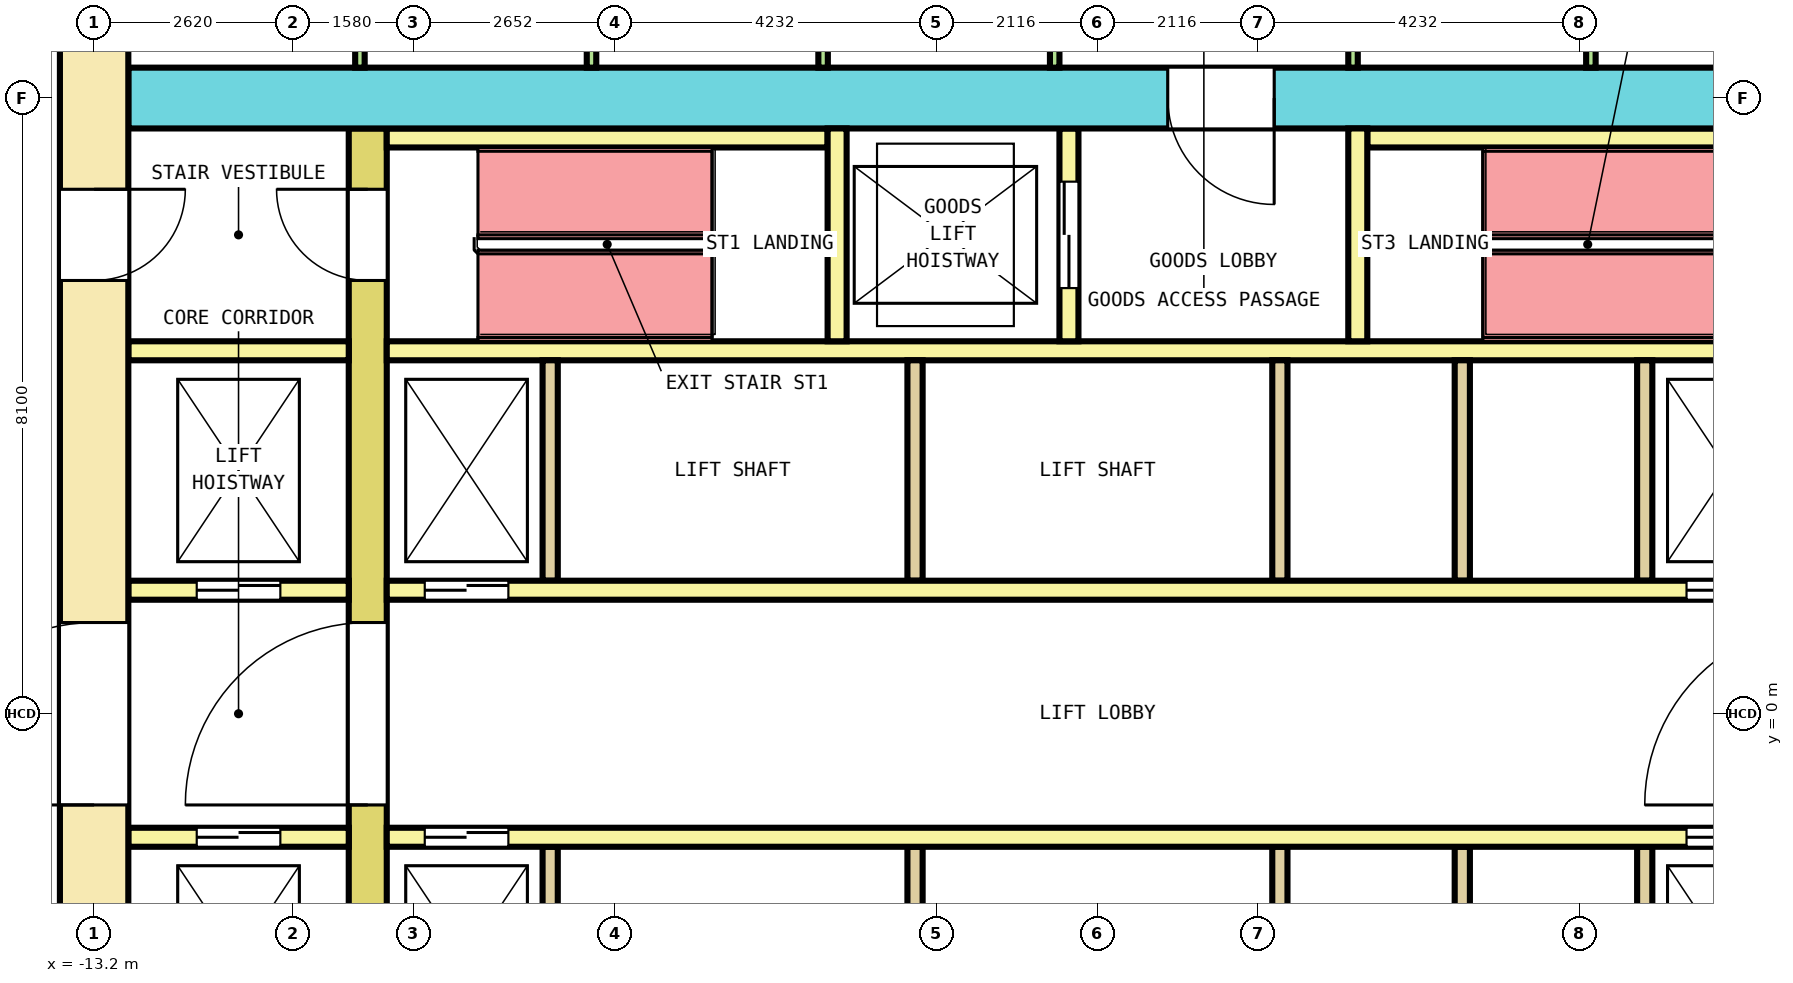
"""IFC4 building model, lengths in metres.
Left out: names, types, materials, properties, quantities, classifications, styles, units other than length and angle.
Written with IfcOpenShell. Run it as: python <this file> out.ifc"""

import sys

from ifc_helpers import new_model, si_unit, direction, frame, frame_2d, origin, place, context, subcontext, project, spatial, rectangle, extrude, element, fill, save


model = new_model("IFC4")
c1 = context("Model", 3, precision=1e-05, world=origin(), true_north=direction((0.0, 1.0)))
c2 = subcontext(c1, "Body", "Model", "MODEL_VIEW")
j1 = project(units=[si_unit("LENGTHUNIT", "METRE"), si_unit("PLANEANGLEUNIT", "RADIAN")], contexts=[c1])
p1 = place(None, origin())
s1 = spatial("IfcSite", under=j1, at=p1, CompositionType="ELEMENT")
p2 = place(p1, origin())
s2 = spatial("IfcBuilding", under=s1, at=p2, CompositionType="ELEMENT")
p3 = place(p2, frame((0.0, 0.0, 19.0)))
s3 = spatial("IfcBuildingStorey", under=s2, at=p3, CompositionType="ELEMENT", Elevation=19.0)
p4 = place(p3, frame((-13.2, -10.35, 0.0), z_axis=(0.0, 0.0, 1.0), x_axis=(0.0, 1.0, 0.0)))
e1 = element("IfcWall", 1, at=p4, inside=s3, PredefinedType="SHEAR", context=c2, shape_type="SweptSolid", body=[
    extrude(rectangle(XDim=20.7, YDim=0.9, at=frame_2d((10.35, 0.0))), origin(), (0.0, 0.0, 1.0), 4.1),
])
p5 = place(p4, frame((9.15, 0.0, 0.0)))
e2 = element("IfcOpeningElement", 2, at=p5, cuts=e1, PredefinedType="OPENING", context=c2, shape_type="SweptSolid", body=[
    extrude(rectangle(XDim=2.4, YDim=2.1, at=frame_2d((1.2, 1.05))), frame((0.0, 0.46, 0.0), z_axis=(0.0, -1.0, 0.0), x_axis=(1.0, 0.0, 0.0)), (0.0, 0.0, 1.0), 0.92),
])
p6 = place(p4, frame((16.05, 0.0, 0.0)))
e3 = element("IfcOpeningElement", 3, at=p6, cuts=e1, PredefinedType="OPENING", context=c2, shape_type="SweptSolid", body=[
    extrude(rectangle(XDim=1.2, YDim=2.1, at=frame_2d((0.6, 1.05))), frame((0.0, 0.46, 0.0), z_axis=(0.0, -1.0, 0.0), x_axis=(1.0, 0.0, 0.0)), (0.0, 0.0, 1.0), 0.92),
])
p7 = place(p4, frame((3.45, 0.0, 0.0)))
e4 = element("IfcOpeningElement", 4, at=p7, cuts=e1, PredefinedType="OPENING", context=c2, shape_type="SweptSolid", body=[
    extrude(rectangle(XDim=1.2, YDim=2.1, at=frame_2d((0.6, 1.05))), frame((0.0, 0.46, 0.0), z_axis=(0.0, -1.0, 0.0), x_axis=(1.0, 0.0, 0.0)), (0.0, 0.0, 1.0), 0.92),
])
p8 = place(p3, frame((-12.75, 8.1, 0.0), z_axis=(0.0, 0.0, 1.0), x_axis=(1.0, 0.0, 0.0)))
e5 = element("IfcWall", 5, at=p8, inside=s3, PredefinedType="SHEAR", context=c2, shape_type="SweptSolid", body=[
    extrude(rectangle(XDim=25.5, YDim=0.8, at=frame_2d((12.75, 0.0))), origin(), (0.0, 0.0, 1.0), 4.1),
])
p9 = place(p8, frame((13.675, 0.0, 0.0)))
e6 = element("IfcOpeningElement", 6, at=p9, cuts=e5, PredefinedType="OPENING", context=c2, shape_type="SweptSolid", body=[
    extrude(rectangle(XDim=1.4, YDim=2.1, at=frame_2d((0.7, 1.05))), frame((0.0, 0.41, 0.0), z_axis=(0.0, -1.0, 0.0), x_axis=(1.0, 0.0, 0.0)), (0.0, 0.0, 1.0), 0.82),
])
p10 = place(p3, frame((-9.6, -7.7, 0.0), z_axis=(0.0, 0.0, 1.0), x_axis=(0.0, 1.0, 0.0)))
e7 = element("IfcWall", 7, at=p10, inside=s3, PredefinedType="SHEAR", context=c2, shape_type="SweptSolid", body=[
    extrude(rectangle(XDim=15.4, YDim=0.5, at=frame_2d((7.7, 0.0))), origin(), (0.0, 0.0, 1.0), 4.1),
])
p11 = place(p10, frame((6.5, 0.0, 0.0)))
e8 = element("IfcOpeningElement", 8, at=p11, cuts=e7, PredefinedType="OPENING", context=c2, shape_type="SweptSolid", body=[
    extrude(rectangle(XDim=2.4, YDim=2.1, at=frame_2d((1.2, 1.05))), frame((0.0, 0.26, 0.0), z_axis=(0.0, -1.0, 0.0), x_axis=(1.0, 0.0, 0.0)), (0.0, 0.0, 1.0), 0.52),
])
p12 = place(p10, frame((13.4, 0.0, 0.0)))
e9 = element("IfcOpeningElement", 9, at=p12, cuts=e7, PredefinedType="OPENING", context=c2, shape_type="SweptSolid", body=[
    extrude(rectangle(XDim=1.2, YDim=2.1, at=frame_2d((0.6, 1.05))), frame((0.0, 0.26, 0.0), z_axis=(0.0, -1.0, 0.0), x_axis=(1.0, 0.0, 0.0)), (0.0, 0.0, 1.0), 0.52),
])
p13 = place(p10, frame((0.8, 0.0, 0.0)))
e10 = element("IfcOpeningElement", 10, at=p13, cuts=e7, PredefinedType="OPENING", context=c2, shape_type="SweptSolid", body=[
    extrude(rectangle(XDim=1.2, YDim=2.1, at=frame_2d((0.6, 1.05))), frame((0.0, 0.26, 0.0), z_axis=(0.0, -1.0, 0.0), x_axis=(1.0, 0.0, 0.0)), (0.0, 0.0, 1.0), 0.52),
])
p14 = place(p3, frame((-12.75, 1.625, 0.0), z_axis=(0.0, 0.0, 1.0), x_axis=(1.0, 0.0, 0.0)))
e11 = element("IfcWall", 11, at=p14, inside=s3, PredefinedType="SOLIDWALL", context=c2, shape_type="SweptSolid", body=[
    extrude(rectangle(XDim=2.9, YDim=0.25, at=frame_2d((1.45, 0.0))), origin(), (0.0, 0.0, 1.0), 4.1),
])
p15 = place(p14, frame((0.9, 0.0, 0.0)))
e12 = element("IfcOpeningElement", 12, at=p15, cuts=e11, PredefinedType="OPENING", context=c2, shape_type="SweptSolid", body=[
    extrude(rectangle(XDim=1.1, YDim=2.1, at=frame_2d((0.55, 1.05))), frame((0.0, 0.135, 0.0), z_axis=(0.0, -1.0, 0.0), x_axis=(1.0, 0.0, 0.0)), (0.0, 0.0, 1.0), 0.27),
])
p16 = place(p3, frame((-9.35, 1.625, 0.0), z_axis=(0.0, 0.0, 1.0), x_axis=(1.0, 0.0, 0.0)))
e13 = element("IfcWall", 13, at=p16, inside=s3, PredefinedType="SOLIDWALL", context=c2, shape_type="SweptSolid", body=[
    extrude(rectangle(XDim=18.7, YDim=0.25, at=frame_2d((9.35, 0.0))), origin(), (0.0, 0.0, 1.0), 4.1),
])
p17 = place(p16, frame((0.5, 0.0, 0.0)))
e14 = element("IfcOpeningElement", 14, at=p17, cuts=e13, PredefinedType="OPENING", context=c2, shape_type="SweptSolid", body=[
    extrude(rectangle(XDim=1.1, YDim=2.1, at=frame_2d((0.55, 1.05))), frame((0.0, 0.135, 0.0), z_axis=(0.0, -1.0, 0.0), x_axis=(1.0, 0.0, 0.0)), (0.0, 0.0, 1.0), 0.27),
])
p18 = place(p16, frame((17.1, 0.0, 0.0)))
e15 = element("IfcOpeningElement", 15, at=p18, cuts=e13, PredefinedType="OPENING", context=c2, shape_type="SweptSolid", body=[
    extrude(rectangle(XDim=1.1, YDim=2.1, at=frame_2d((0.55, 1.05))), frame((0.0, 0.135, 0.0), z_axis=(0.0, -1.0, 0.0), x_axis=(1.0, 0.0, 0.0)), (0.0, 0.0, 1.0), 0.27),
])
p19 = place(p3, frame((-12.75, 4.775, 0.0), z_axis=(0.0, 0.0, 1.0), x_axis=(1.0, 0.0, 0.0)))
e16 = element("IfcWall", 16, at=p19, inside=s3, PredefinedType="SOLIDWALL", context=c2, shape_type="SweptSolid", body=[
    extrude(rectangle(XDim=2.9, YDim=0.25, at=frame_2d((1.45, 0.0))), origin(), (0.0, 0.0, 1.0), 4.1),
])
p20 = place(p3, frame((-9.35, 4.775, 0.0), z_axis=(0.0, 0.0, 1.0), x_axis=(1.0, 0.0, 0.0)))
e17 = element("IfcWall", 17, at=p20, inside=s3, PredefinedType="SOLIDWALL", context=c2, shape_type="SweptSolid", body=[
    extrude(rectangle(XDim=18.7, YDim=0.25, at=frame_2d((9.35, 0.0))), origin(), (0.0, 0.0, 1.0), 4.1),
])
for number, where, z_axis, x_axis in (
    (18, (-7.2, 1.75, 0.0), (0.0, 0.0, 1.0), (0.0, 1.0, 0.0)),
    (19, (-2.4, 1.75, 0.0), (0.0, 0.0, 1.0), (0.0, 1.0, 0.0)),
    (20, (2.4, 1.75, 0.0), (0.0, 0.0, 1.0), (0.0, 1.0, 0.0)),
    (21, (4.8, 1.75, 0.0), (0.0, 0.0, 1.0), (0.0, 1.0, 0.0)),
    (22, (7.2, 1.75, 0.0), (0.0, 0.0, 1.0), (0.0, 1.0, 0.0)),
):
    element("IfcWall", number, at=place(p3, frame(where, z_axis=z_axis, x_axis=x_axis)), inside=s3, PredefinedType="SOLIDWALL", context=c2, shape_type="SweptSolid", body=[
        extrude(rectangle(XDim=2.9, YDim=0.2, at=frame_2d((1.45, 0.0))), origin(), (0.0, 0.0, 1.0), 4.1),
    ])
p21 = place(p3, frame((-12.75, -1.625, 0.0), z_axis=(0.0, 0.0, 1.0), x_axis=(1.0, 0.0, 0.0)))
e23 = element("IfcWall", 23, at=p21, inside=s3, PredefinedType="SOLIDWALL", context=c2, shape_type="SweptSolid", body=[
    extrude(rectangle(XDim=2.9, YDim=0.25, at=frame_2d((1.45, 0.0))), origin(), (0.0, 0.0, 1.0), 4.1),
])
p22 = place(p21, frame((0.9, 0.0, 0.0)))
e24 = element("IfcOpeningElement", 24, at=p22, cuts=e23, PredefinedType="OPENING", context=c2, shape_type="SweptSolid", body=[
    extrude(rectangle(XDim=1.1, YDim=2.1, at=frame_2d((0.55, 1.05))), frame((0.0, 0.135, 0.0), z_axis=(0.0, -1.0, 0.0), x_axis=(1.0, 0.0, 0.0)), (0.0, 0.0, 1.0), 0.27),
])
p23 = place(p3, frame((-9.35, -1.625, 0.0), z_axis=(0.0, 0.0, 1.0), x_axis=(1.0, 0.0, 0.0)))
e25 = element("IfcWall", 25, at=p23, inside=s3, PredefinedType="SOLIDWALL", context=c2, shape_type="SweptSolid", body=[
    extrude(rectangle(XDim=18.7, YDim=0.25, at=frame_2d((9.35, 0.0))), origin(), (0.0, 0.0, 1.0), 4.1),
])
p24 = place(p23, frame((0.5, 0.0, 0.0)))
e26 = element("IfcOpeningElement", 26, at=p24, cuts=e25, PredefinedType="OPENING", context=c2, shape_type="SweptSolid", body=[
    extrude(rectangle(XDim=1.1, YDim=2.1, at=frame_2d((0.55, 1.05))), frame((0.0, 0.135, 0.0), z_axis=(0.0, -1.0, 0.0), x_axis=(1.0, 0.0, 0.0)), (0.0, 0.0, 1.0), 0.27),
])
p25 = place(p23, frame((17.1, 0.0, 0.0)))
e27 = element("IfcOpeningElement", 27, at=p25, cuts=e25, PredefinedType="OPENING", context=c2, shape_type="SweptSolid", body=[
    extrude(rectangle(XDim=1.1, YDim=2.1, at=frame_2d((0.55, 1.05))), frame((0.0, 0.135, 0.0), z_axis=(0.0, -1.0, 0.0), x_axis=(1.0, 0.0, 0.0)), (0.0, 0.0, 1.0), 0.27),
])
for number, where, z_axis, x_axis in (
    (28, (-7.2, -4.65, 0.0), (0.0, 0.0, 1.0), (0.0, 1.0, 0.0)),
    (29, (-2.4, -4.65, 0.0), (0.0, 0.0, 1.0), (0.0, 1.0, 0.0)),
    (30, (2.4, -4.65, 0.0), (0.0, 0.0, 1.0), (0.0, 1.0, 0.0)),
    (31, (4.8, -4.65, 0.0), (0.0, 0.0, 1.0), (0.0, 1.0, 0.0)),
    (32, (7.2, -4.65, 0.0), (0.0, 0.0, 1.0), (0.0, 1.0, 0.0)),
):
    element("IfcWall", number, at=place(p3, frame(where, z_axis=z_axis, x_axis=x_axis)), inside=s3, PredefinedType="SOLIDWALL", context=c2, shape_type="SweptSolid", body=[
        extrude(rectangle(XDim=2.9, YDim=0.2, at=frame_2d((1.45, 0.0))), origin(), (0.0, 0.0, 1.0), 4.1),
    ])
for number, where, z_axis, x_axis in (
    (33, (-9.35, 7.575, 0.0), (0.0, 0.0, 1.0), (1.0, 0.0, 0.0)),
    (34, (3.55, 7.575, 0.0), (0.0, 0.0, 1.0), (1.0, 0.0, 0.0)),
):
    element("IfcWall", number, at=place(p3, frame(where, z_axis=z_axis, x_axis=x_axis)), inside=s3, PredefinedType="SOLIDWALL", context=c2, shape_type="SweptSolid", body=[
        extrude(rectangle(XDim=5.8, YDim=0.25, at=frame_2d((2.9, 0.0))), origin(), (0.0, 0.0, 1.0), 4.1),
    ])
p26 = place(p3, frame((-3.425, 4.9, 0.0), z_axis=(0.0, 0.0, 1.0), x_axis=(0.0, 1.0, 0.0)))
e35 = element("IfcWall", 35, at=p26, inside=s3, PredefinedType="SOLIDWALL", context=c2, shape_type="SweptSolid", body=[
    extrude(rectangle(XDim=2.8, YDim=0.25, at=frame_2d((1.4, 0.0))), origin(), (0.0, 0.0, 1.0), 4.1),
])
p27 = place(p3, frame((-0.375, 4.9, 0.0), z_axis=(0.0, 0.0, 1.0), x_axis=(0.0, 1.0, 0.0)))
e36 = element("IfcWall", 36, at=p27, inside=s3, PredefinedType="SOLIDWALL", context=c2, shape_type="SweptSolid", body=[
    extrude(rectangle(XDim=2.8, YDim=0.25, at=frame_2d((1.4, 0.0))), origin(), (0.0, 0.0, 1.0), 4.1),
])
p28 = place(p27, frame((0.7, 0.0, 0.0)))
e37 = element("IfcOpeningElement", 37, at=p28, cuts=e36, PredefinedType="OPENING", context=c2, shape_type="SweptSolid", body=[
    extrude(rectangle(XDim=1.4, YDim=2.1, at=frame_2d((0.7, 1.05))), frame((0.0, 0.135, 0.0), z_axis=(0.0, -1.0, 0.0), x_axis=(1.0, 0.0, 0.0)), (0.0, 0.0, 1.0), 0.27),
])
p29 = place(p3, frame((3.425, 4.9, 0.0), z_axis=(0.0, 0.0, 1.0), x_axis=(0.0, 1.0, 0.0)))
e38 = element("IfcWall", 38, at=p29, inside=s3, PredefinedType="SOLIDWALL", context=c2, shape_type="SweptSolid", body=[
    extrude(rectangle(XDim=2.8, YDim=0.25, at=frame_2d((1.4, 0.0))), origin(), (0.0, 0.0, 1.0), 4.1),
])
for number, where, z_axis, x_axis in (
    (39, (-9.703, 8.5, 0.0), (0.0, 0.0, 1.0), (0.0, 1.0, 0.0)),
    (40, (-6.656, 8.5, 0.0), (0.0, 0.0, 1.0), (0.0, 1.0, 0.0)),
    (41, (-3.609, 8.5, 0.0), (0.0, 0.0, 1.0), (0.0, 1.0, 0.0)),
    (42, (-0.562, 8.5, 0.0), (0.0, 0.0, 1.0), (0.0, 1.0, 0.0)),
    (43, (3.363, 8.5, 0.0), (0.0, 0.0, 1.0), (0.0, 1.0, 0.0)),
    (44, (6.492, 8.5, 0.0), (0.0, 0.0, 1.0), (0.0, 1.0, 0.0)),
):
    element("IfcWall", number, at=place(p3, frame(where, z_axis=z_axis, x_axis=x_axis)), inside=s3, PredefinedType="PARTITIONING", context=c2, shape_type="SweptSolid", body=[
        extrude(rectangle(XDim=1.85, YDim=0.125, at=frame_2d((0.925, 0.0))), origin(), (0.0, 0.0, 1.0), 4.1),
    ])
p30 = place(p15, origin())
e45 = element("IfcDoor", 45, at=p30, inside=s3, OperationType="DOUBLE_DOOR_SLIDING", PredefinedType="DOOR", context=c2, shape_type="SweptSolid", body=[
    extrude(rectangle(XDim=1.1, YDim=2.1, at=frame_2d((0.55, 1.05))), frame((0.0, 0.075, 0.0), z_axis=(0.0, -1.0, 0.0), x_axis=(1.0, 0.0, 0.0)), (0.0, 0.0, 1.0), 0.15),
])
fill(e12, e45)
p31 = place(p17, origin())
e46 = element("IfcDoor", 46, at=p31, inside=s3, OperationType="DOUBLE_DOOR_SLIDING", PredefinedType="DOOR", context=c2, shape_type="SweptSolid", body=[
    extrude(rectangle(XDim=1.1, YDim=2.1, at=frame_2d((0.55, 1.05))), frame((0.0, 0.075, 0.0), z_axis=(0.0, -1.0, 0.0), x_axis=(1.0, 0.0, 0.0)), (0.0, 0.0, 1.0), 0.15),
])
fill(e14, e46)
p32 = place(p18, origin())
e47 = element("IfcDoor", 47, at=p32, inside=s3, OperationType="DOUBLE_DOOR_SLIDING", PredefinedType="DOOR", context=c2, shape_type="SweptSolid", body=[
    extrude(rectangle(XDim=1.1, YDim=2.1, at=frame_2d((0.55, 1.05))), frame((0.0, 0.075, 0.0), z_axis=(0.0, -1.0, 0.0), x_axis=(1.0, 0.0, 0.0)), (0.0, 0.0, 1.0), 0.15),
])
fill(e15, e47)
p33 = place(p22, origin())
e48 = element("IfcDoor", 48, at=p33, inside=s3, OperationType="DOUBLE_DOOR_SLIDING", PredefinedType="DOOR", context=c2, shape_type="SweptSolid", body=[
    extrude(rectangle(XDim=1.1, YDim=2.1, at=frame_2d((0.55, 1.05))), frame((0.0, 0.075, 0.0), z_axis=(0.0, -1.0, 0.0), x_axis=(1.0, 0.0, 0.0)), (0.0, 0.0, 1.0), 0.15),
])
fill(e24, e48)
p34 = place(p24, origin())
e49 = element("IfcDoor", 49, at=p34, inside=s3, OperationType="DOUBLE_DOOR_SLIDING", PredefinedType="DOOR", context=c2, shape_type="SweptSolid", body=[
    extrude(rectangle(XDim=1.1, YDim=2.1, at=frame_2d((0.55, 1.05))), frame((0.0, 0.075, 0.0), z_axis=(0.0, -1.0, 0.0), x_axis=(1.0, 0.0, 0.0)), (0.0, 0.0, 1.0), 0.15),
])
fill(e26, e49)
p35 = place(p25, origin())
e50 = element("IfcDoor", 50, at=p35, inside=s3, OperationType="DOUBLE_DOOR_SLIDING", PredefinedType="DOOR", context=c2, shape_type="SweptSolid", body=[
    extrude(rectangle(XDim=1.1, YDim=2.1, at=frame_2d((0.55, 1.05))), frame((0.0, 0.075, 0.0), z_axis=(0.0, -1.0, 0.0), x_axis=(1.0, 0.0, 0.0)), (0.0, 0.0, 1.0), 0.15),
])
fill(e27, e50)
p36 = place(p28, origin())
e51 = element("IfcDoor", 51, at=p36, inside=s3, OperationType="DOUBLE_DOOR_SLIDING", PredefinedType="DOOR", context=c2, shape_type="SweptSolid", body=[
    extrude(rectangle(XDim=1.4, YDim=2.1, at=frame_2d((0.7, 1.05))), frame((0.0, 0.075, 0.0), z_axis=(0.0, -1.0, 0.0), x_axis=(1.0, 0.0, 0.0)), (0.0, 0.0, 1.0), 0.15),
])
fill(e37, e51)
p37 = place(p11, origin())
e52 = element("IfcDoor", 52, at=p37, inside=s3, OperationType="DOUBLE_DOOR_SINGLE_SWING", PredefinedType="DOOR", context=c2, shape_type="SweptSolid", body=[
    extrude(rectangle(XDim=2.4, YDim=2.1, at=frame_2d((1.2, 1.05))), frame((0.0, 0.2, 0.0), z_axis=(0.0, -1.0, 0.0), x_axis=(1.0, 0.0, 0.0)), (0.0, 0.0, 1.0), 0.4),
])
fill(e8, e52)
p38 = place(p5, origin())
e53 = element("IfcDoor", 53, at=p38, inside=s3, OperationType="DOUBLE_DOOR_SINGLE_SWING", PredefinedType="DOOR", context=c2, shape_type="SweptSolid", body=[
    extrude(rectangle(XDim=2.4, YDim=2.1, at=frame_2d((1.2, 1.05))), frame((0.0, 0.3, 0.0), z_axis=(0.0, -1.0, 0.0), x_axis=(1.0, 0.0, 0.0)), (0.0, 0.0, 1.0), 0.6),
])
fill(e2, e53)
p39 = place(p12, origin())
e54 = element("IfcDoor", 54, at=p39, inside=s3, OperationType="SINGLE_SWING_RIGHT", PredefinedType="DOOR", context=c2, shape_type="SweptSolid", body=[
    extrude(rectangle(XDim=1.2, YDim=2.1, at=frame_2d((0.6, 1.05))), frame((0.0, 0.2, 0.0), z_axis=(0.0, -1.0, 0.0), x_axis=(1.0, 0.0, 0.0)), (0.0, 0.0, 1.0), 0.4),
])
fill(e9, e54)
p40 = place(p6, origin())
e55 = element("IfcDoor", 55, at=p40, inside=s3, OperationType="SINGLE_SWING_LEFT", PredefinedType="DOOR", context=c2, shape_type="SweptSolid", body=[
    extrude(rectangle(XDim=1.2, YDim=2.1, at=frame_2d((0.6, 1.05))), frame((0.0, 0.3, 0.0), z_axis=(0.0, -1.0, 0.0), x_axis=(1.0, 0.0, 0.0)), (0.0, 0.0, 1.0), 0.6),
])
fill(e3, e55)
p41 = place(p9, origin())
e56 = element("IfcDoor", 56, at=p41, inside=s3, OperationType="DOUBLE_DOOR_SINGLE_SWING", PredefinedType="DOOR", context=c2, shape_type="SweptSolid", body=[
    extrude(rectangle(XDim=1.4, YDim=2.1, at=frame_2d((0.7, 1.05))), frame((0.0, 0.3, 0.0), z_axis=(0.0, -1.0, 0.0), x_axis=(1.0, 0.0, 0.0)), (0.0, 0.0, 1.0), 0.6),
])
fill(e6, e56)
save(model, sys.argv[1])
